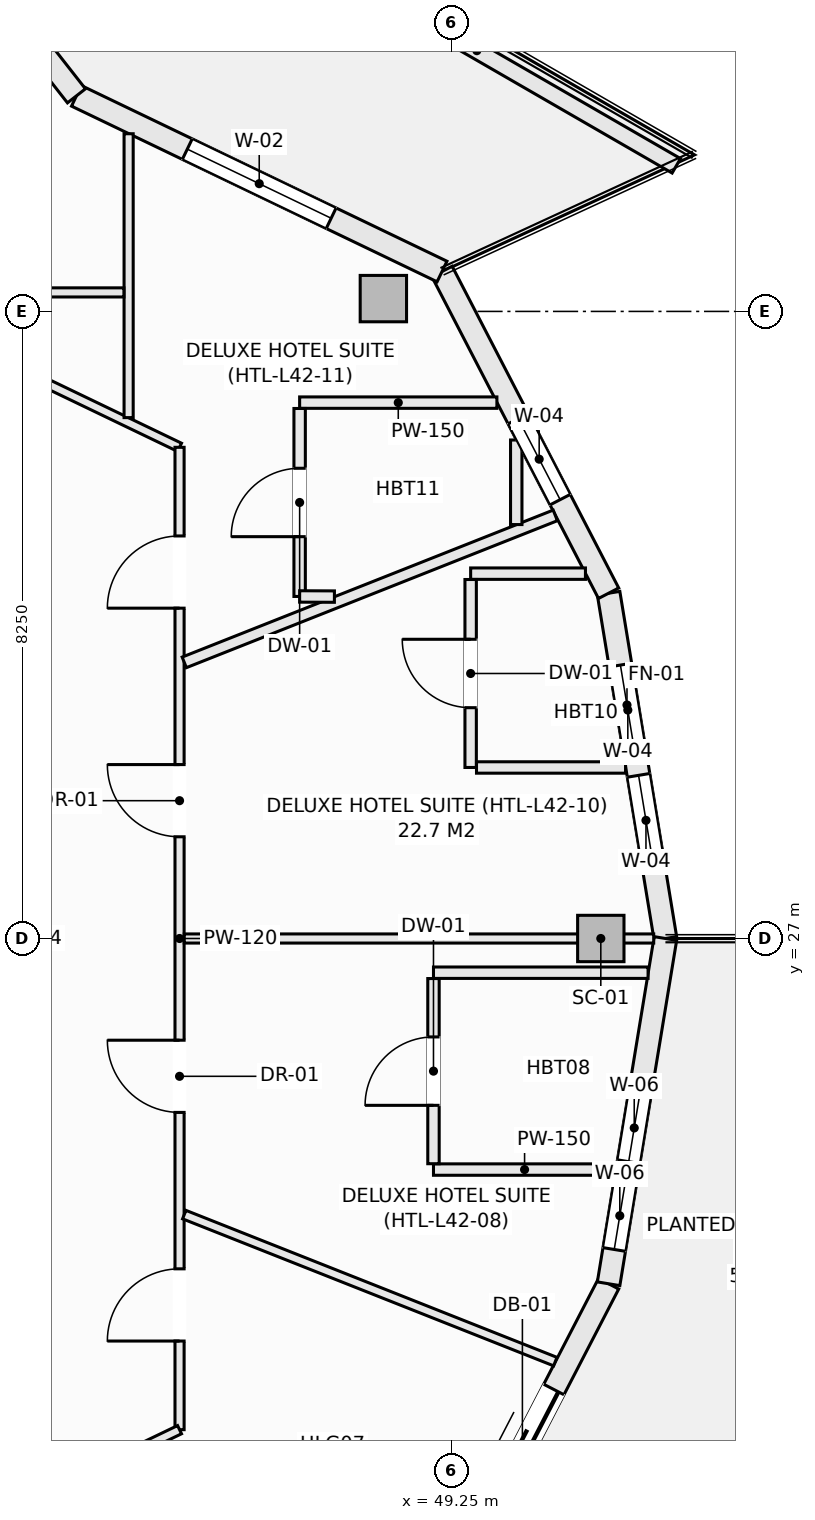
"""IFC4 building model, lengths in metres.
Left out: names, types, materials, properties, quantities, classifications, styles, units other than length and angle.
Written with IfcOpenShell. Run it as: python <this file> out.ifc"""

import sys

from ifc_helpers import new_model, si_unit, direction, frame, frame_2d, origin, origin_2d, place, context, subcontext, project, spatial, rectangle, hollow_rectangle, extrude, element, fill, save


model = new_model("IFC4")
c1 = context("Model", 3, precision=1e-05, world=origin(), true_north=direction((0.0, 1.0)))
c2 = subcontext(c1, "Body", "Model", "MODEL_VIEW")
j1 = project(units=[si_unit("LENGTHUNIT", "METRE"), si_unit("PLANEANGLEUNIT", "RADIAN")], contexts=[c1])
p1 = place(None, origin())
s1 = spatial("IfcSite", under=j1, at=p1, CompositionType="ELEMENT")
p2 = place(p1, origin())
s2 = spatial("IfcBuilding", under=s1, at=p2, CompositionType="ELEMENT")
p3 = place(p2, frame((0.0, 0.0, 163.1)))
s3 = spatial("IfcBuildingStorey", under=s2, at=p3, CompositionType="ELEMENT", Elevation=163.1)
for number, where, z_axis, x_axis in (
    (1, (51.212, 27.0, -0.27), (0.0, 0.0, 1.0), (1.0, 0.0, 0.0)),
    (2, (48.352, 35.419, -0.27), (0.0, 0.0, 1.0), (1.0, 0.0, 0.0)),
):
    element("IfcColumn", number, at=place(p3, frame(where, z_axis=z_axis, x_axis=x_axis)), inside=s3, PredefinedType="COLUMN", context=c2, shape_type="SweptSolid", body=[
        extrude(hollow_rectangle(XDim=0.61, YDim=0.61, WallThickness=0.025, at=origin_2d()), origin(), (0.0, 0.0, 1.0), 3.4),
    ])
p4 = place(p3, frame((51.315, 31.542, 0.0), z_axis=(0.0, 0.0, 1.0), x_axis=(0.162394765401, -0.986725868806, 0.0)))
e3 = element("IfcWall", 3, at=p4, inside=s3, PredefinedType="SOLIDWALL", context=c2, shape_type="SweptSolid", body=[
    extrude(rectangle(XDim=4.603, YDim=0.3, at=frame_2d((2.302, 0.0))), origin(), (0.0, 0.0, 1.0), 2.653),
])
p5 = place(p4, frame((0.958, 0.0, 0.74)))
e4 = element("IfcOpeningElement", 4, at=p5, cuts=e3, PredefinedType="OPENING", context=c2, shape_type="SweptSolid", body=[
    extrude(rectangle(XDim=1.2, YDim=1.7, at=frame_2d((0.6, 0.85))), frame((0.0, 0.16, 0.0), z_axis=(0.0, -1.0, 0.0), x_axis=(1.0, 0.0, 0.0)), (0.0, 0.0, 1.0), 0.32),
])
p6 = place(p4, frame((2.428, 0.0, 0.74)))
e5 = element("IfcOpeningElement", 5, at=p6, cuts=e3, PredefinedType="OPENING", context=c2, shape_type="SweptSolid", body=[
    extrude(rectangle(XDim=1.2, YDim=1.7, at=frame_2d((0.6, 0.85))), frame((0.0, 0.16, 0.0), z_axis=(0.0, -1.0, 0.0), x_axis=(1.0, 0.0, 0.0)), (0.0, 0.0, 1.0), 0.32),
])
p7 = place(p3, frame((49.123, 35.775, 0.0), z_axis=(0.0, 0.0, 1.0), x_axis=(0.459810251451, -0.888017191647, 0.0)))
e6 = element("IfcWall", 6, at=p7, inside=s3, PredefinedType="SOLIDWALL", context=c2, shape_type="SweptSolid", body=[
    extrude(rectangle(XDim=4.766, YDim=0.3, at=frame_2d((2.383, 0.0))), origin(), (0.0, 0.0, 1.0), 2.653),
])
p8 = place(p7, frame((2.18, 0.0, 0.72)))
e7 = element("IfcOpeningElement", 7, at=p8, cuts=e6, PredefinedType="OPENING", context=c2, shape_type="SweptSolid", body=[
    extrude(rectangle(XDim=1.2, YDim=1.65, at=frame_2d((0.6, 0.825))), frame((0.0, 0.16, 0.0), z_axis=(0.0, -1.0, 0.0), x_axis=(1.0, 0.0, 0.0)), (0.0, 0.0, 1.0), 0.32),
])
p9 = place(p3, frame((44.313, 38.086, 0.0), z_axis=(0.0, 0.0, 1.0), x_axis=(0.901353070301, -0.433085029363, 0.0)))
e8 = element("IfcWall", 8, at=p9, inside=s3, PredefinedType="SOLIDWALL", context=c2, shape_type="SweptSolid", body=[
    extrude(rectangle(XDim=5.336, YDim=0.3, at=frame_2d((2.668, 0.0))), origin(), (0.0, 0.0, 1.0), 2.653),
])
p10 = place(p9, frame((1.618, 0.0, 0.74)))
e9 = element("IfcOpeningElement", 9, at=p10, cuts=e8, PredefinedType="OPENING", context=c2, shape_type="SweptSolid", body=[
    extrude(rectangle(XDim=2.1, YDim=1.7, at=frame_2d((1.05, 0.85))), frame((0.0, 0.16, 0.0), z_axis=(0.0, -1.0, 0.0), x_axis=(1.0, 0.0, 0.0)), (0.0, 0.0, 1.0), 0.32),
])
p11 = place(p3, frame((41.094, 42.199, 0.0), z_axis=(0.0, 0.0, 1.0), x_axis=(0.616429245738, -0.787410302828, 0.0)))
e10 = element("IfcWall", 10, at=p11, inside=s3, PredefinedType="SOLIDWALL", context=c2, shape_type="SweptSolid", body=[
    extrude(rectangle(XDim=5.223, YDim=0.3, at=frame_2d((2.612, 0.0))), origin(), (0.0, 0.0, 1.0), 2.653),
])
p12 = place(p11, frame((1.712, 0.0, 0.0)))
e11 = element("IfcOpeningElement", 11, at=p12, cuts=e10, PredefinedType="OPENING", context=c2, shape_type="SweptSolid", body=[
    extrude(rectangle(XDim=1.8, YDim=2.25, at=frame_2d((0.9, 1.125))), frame((0.0, 0.16, 0.0), z_axis=(0.0, -1.0, 0.0), x_axis=(1.0, 0.0, 0.0)), (0.0, 0.0, 1.0), 0.32),
])
p13 = place(p3, frame((49.123, 18.225, 0.0), z_axis=(0.0, 0.0, 1.0), x_axis=(0.459810251451, 0.888017191647, 0.0)))
e12 = element("IfcWall", 12, at=p13, inside=s3, PredefinedType="SOLIDWALL", context=c2, shape_type="SweptSolid", body=[
    extrude(rectangle(XDim=4.766, YDim=0.3, at=frame_2d((2.383, 0.0))), origin(), (0.0, 0.0, 1.0), 2.653),
])
p14 = place(p13, frame((1.4, 0.0, 0.0)))
e13 = element("IfcOpeningElement", 13, at=p14, cuts=e12, PredefinedType="OPENING", context=c2, shape_type="SweptSolid", body=[
    extrude(rectangle(XDim=1.8, YDim=2.25, at=frame_2d((0.9, 1.125))), frame((0.0, 0.16, 0.0), z_axis=(0.0, -1.0, 0.0), x_axis=(1.0, 0.0, 0.0)), (0.0, 0.0, 1.0), 0.32),
])
p15 = place(p3, frame((51.315, 22.458, 0.0), z_axis=(0.0, 0.0, 1.0), x_axis=(0.162394765401, 0.986725868806, 0.0)))
e14 = element("IfcWall", 14, at=p15, inside=s3, PredefinedType="SOLIDWALL", context=c2, shape_type="SweptSolid", body=[
    extrude(rectangle(XDim=4.603, YDim=0.3, at=frame_2d((2.302, 0.0))), origin(), (0.0, 0.0, 1.0), 2.653),
])
p16 = place(p15, frame((0.457, 0.0, 0.72)))
e15 = element("IfcOpeningElement", 15, at=p16, cuts=e14, PredefinedType="OPENING", context=c2, shape_type="SweptSolid", body=[
    extrude(rectangle(XDim=0.9, YDim=1.65, at=frame_2d((0.45, 0.825))), frame((0.0, 0.16, 0.0), z_axis=(0.0, -1.0, 0.0), x_axis=(1.0, 0.0, 0.0)), (0.0, 0.0, 1.0), 0.32),
])
p17 = place(p15, frame((1.627, 0.0, 0.72)))
e16 = element("IfcOpeningElement", 16, at=p17, cuts=e14, PredefinedType="OPENING", context=c2, shape_type="SweptSolid", body=[
    extrude(rectangle(XDim=0.9, YDim=1.65, at=frame_2d((0.45, 0.825))), frame((0.0, 0.16, 0.0), z_axis=(0.0, -1.0, 0.0), x_axis=(1.0, 0.0, 0.0)), (0.0, 0.0, 1.0), 0.32),
])
p18 = place(p3, frame((46.958, 40.195, 0.0), z_axis=(0.0, 0.0, 1.0), x_axis=(0.866058128659, -0.499943314571, 0.0)))
e17 = element("IfcWall", 17, at=p18, inside=s3, PredefinedType="PARAPET", context=c2, shape_type="SweptSolid", body=[
    extrude(rectangle(XDim=6.06, YDim=0.22, at=frame_2d((3.03, 0.0))), origin(), (0.0, 0.0, 1.0), 0.52),
])
p19 = place(p3, frame((52.18, 16.779, 0.0), z_axis=(0.0, 0.0, 1.0), x_axis=(0.439637174641, 0.898175458735, 0.0)))
e18 = element("IfcWall", 18, at=p19, inside=s3, PredefinedType="PARAPET", context=c2, shape_type="SweptSolid", body=[
    extrude(rectangle(XDim=5.567, YDim=0.22, at=frame_2d((2.784, 0.0))), origin(), (0.0, 0.0, 1.0), 0.52),
])
p20 = place(p3, frame((49.011, 23.96, 0.0), z_axis=(0.0, 0.0, 1.0), x_axis=(1.0, 0.0, 0.0)))
e19 = element("IfcWall", 19, at=p20, inside=s3, PredefinedType="PARTITIONING", context=c2, shape_type="SweptSolid", body=[
    extrude(rectangle(XDim=2.397, YDim=0.15, at=frame_2d((1.199, 0.0))), origin(), (0.0, 0.0, 1.0), 3.13),
])
p21 = place(p3, frame((43.812, 34.355, 0.0), z_axis=(0.0, 0.0, 1.0), x_axis=(0.901236415331, -0.433327732417, 0.0)))
e20 = element("IfcWall", 20, at=p21, inside=s3, PredefinedType="PARTITIONING", context=c2, shape_type="SweptSolid", body=[
    extrude(rectangle(XDim=2.062, YDim=0.12, at=frame_2d((1.031, 0.0))), origin(), (0.0, 0.0, 1.0), 3.13),
])
p22 = place(p3, frame((45.67, 20.538, 0.0), z_axis=(0.0, 0.0, 1.0), x_axis=(0.0, 1.0, 0.0)))
e21 = element("IfcWall", 21, at=p22, inside=s3, PredefinedType="PARTITIONING", context=c2, shape_type="SweptSolid", body=[
    extrude(rectangle(XDim=12.924, YDim=0.12, at=frame_2d((6.462, 0.0))), origin(), (0.0, 0.0, 1.0), 3.13),
])
p23 = place(p22, frame((1.166, 0.0, 0.0)))
e22 = element("IfcOpeningElement", 22, at=p23, cuts=e21, PredefinedType="OPENING", context=c2, shape_type="SweptSolid", body=[
    extrude(rectangle(XDim=0.95, YDim=2.1, at=frame_2d((0.475, 1.05))), frame((0.0, 0.07, 0.0), z_axis=(0.0, -1.0, 0.0), x_axis=(1.0, 0.0, 0.0)), (0.0, 0.0, 1.0), 0.14),
])
p24 = place(p22, frame((4.174, 0.0, 0.0)))
e23 = element("IfcOpeningElement", 23, at=p24, cuts=e21, PredefinedType="OPENING", context=c2, shape_type="SweptSolid", body=[
    extrude(rectangle(XDim=0.95, YDim=2.1, at=frame_2d((0.475, 1.05))), frame((0.0, 0.07, 0.0), z_axis=(0.0, -1.0, 0.0), x_axis=(1.0, 0.0, 0.0)), (0.0, 0.0, 1.0), 0.14),
])
p25 = place(p22, frame((7.8, 0.0, 0.0)))
e24 = element("IfcOpeningElement", 24, at=p25, cuts=e21, PredefinedType="OPENING", context=c2, shape_type="SweptSolid", body=[
    extrude(rectangle(XDim=0.95, YDim=2.1, at=frame_2d((0.475, 1.05))), frame((0.0, 0.07, 0.0), z_axis=(0.0, -1.0, 0.0), x_axis=(1.0, 0.0, 0.0)), (0.0, 0.0, 1.0), 0.14),
])
p26 = place(p22, frame((10.808, 0.0, 0.0)))
e25 = element("IfcOpeningElement", 25, at=p26, cuts=e21, PredefinedType="OPENING", context=c2, shape_type="SweptSolid", body=[
    extrude(rectangle(XDim=0.95, YDim=2.1, at=frame_2d((0.475, 1.05))), frame((0.0, 0.07, 0.0), z_axis=(0.0, -1.0, 0.0), x_axis=(1.0, 0.0, 0.0)), (0.0, 0.0, 1.0), 0.14),
])
p27 = place(p3, frame((43.812, 19.645, 0.0), z_axis=(0.0, 0.0, 1.0), x_axis=(0.901236415331, 0.433327732417, 0.0)))
e26 = element("IfcWall", 26, at=p27, inside=s3, PredefinedType="PARTITIONING", context=c2, shape_type="SweptSolid", body=[
    extrude(rectangle(XDim=2.062, YDim=0.12, at=frame_2d((1.031, 0.0))), origin(), (0.0, 0.0, 1.0), 3.13),
])
p28 = place(p3, frame((45.732, 27.0, 0.0), z_axis=(0.0, 0.0, 1.0), x_axis=(1.0, 0.0, 0.0)))
e27 = element("IfcWall", 27, at=p28, inside=s3, PredefinedType="PARTITIONING", context=c2, shape_type="SweptSolid", body=[
    extrude(rectangle(XDim=6.177, YDim=0.12, at=frame_2d((3.088, 0.0))), origin(), (0.0, 0.0, 1.0), 2.505),
])
p29 = place(p3, frame((45.0, 33.853, 0.0), z_axis=(0.0, 0.0, 1.0), x_axis=(0.0, 1.0, 0.0)))
e28 = element("IfcWall", 28, at=p29, inside=s3, PredefinedType="PARTITIONING", context=c2, shape_type="SweptSolid", body=[
    extrude(rectangle(XDim=3.735, YDim=0.12, at=frame_2d((1.867, 0.0))), origin(), (0.0, 0.0, 1.0), 3.13),
])
p30 = place(p3, frame((45.732, 23.367, 0.0), z_axis=(0.0, 0.0, 1.0), x_axis=(0.929706134606, -0.368302190158, 0.0)))
e29 = element("IfcWall", 29, at=p30, inside=s3, PredefinedType="PARTITIONING", context=c2, shape_type="SweptSolid", body=[
    extrude(rectangle(XDim=5.251, YDim=0.12, at=frame_2d((2.625, 0.0))), origin(), (0.0, 0.0, 1.0), 3.13),
])
p31 = place(p3, frame((49.011, 26.55, 0.0), z_axis=(0.0, 0.0, 1.0), x_axis=(1.0, 0.0, 0.0)))
e30 = element("IfcWall", 30, at=p31, inside=s3, PredefinedType="PARTITIONING", context=c2, shape_type="SweptSolid", body=[
    extrude(rectangle(XDim=2.823, YDim=0.15, at=frame_2d((1.412, 0.0))), origin(), (0.0, 0.0, 1.0), 3.13),
])
p32 = place(p3, frame((49.011, 24.037, 0.0), z_axis=(0.0, 0.0, 1.0), x_axis=(0.0, 1.0, 0.0)))
e31 = element("IfcWall", 31, at=p32, inside=s3, PredefinedType="PARTITIONING", context=c2, shape_type="SweptSolid", body=[
    extrude(rectangle(XDim=2.436, YDim=0.15, at=frame_2d((1.218, 0.0))), origin(), (0.0, 0.0, 1.0), 3.13),
])
p33 = place(p32, frame((0.768, 0.0, 0.0)))
e32 = element("IfcOpeningElement", 32, at=p33, cuts=e31, PredefinedType="OPENING", context=c2, shape_type="SweptSolid", body=[
    extrude(rectangle(XDim=0.9, YDim=2.1, at=frame_2d((0.45, 1.05))), frame((0.0, 0.085, 0.0), z_axis=(0.0, -1.0, 0.0), x_axis=(1.0, 0.0, 0.0)), (0.0, 0.0, 1.0), 0.17),
])
p34 = place(p3, frame((49.5, 31.8, 0.0), z_axis=(0.0, 0.0, 1.0), x_axis=(1.0, 0.0, 0.0)))
e33 = element("IfcWall", 33, at=p34, inside=s3, PredefinedType="PARTITIONING", context=c2, shape_type="SweptSolid", body=[
    extrude(rectangle(XDim=1.51, YDim=0.15, at=frame_2d((0.755, 0.0))), origin(), (0.0, 0.0, 1.0), 3.13),
])
p35 = place(p3, frame((49.5, 29.25, 0.0), z_axis=(0.0, 0.0, 1.0), x_axis=(0.0, 1.0, 0.0)))
e34 = element("IfcWall", 34, at=p35, inside=s3, PredefinedType="PARTITIONING", context=c2, shape_type="SweptSolid", body=[
    extrude(rectangle(XDim=2.473, YDim=0.15, at=frame_2d((1.236, 0.0))), origin(), (0.0, 0.0, 1.0), 2.653),
])
p36 = place(p35, frame((0.787, 0.0, 0.0)))
e35 = element("IfcOpeningElement", 35, at=p36, cuts=e34, PredefinedType="OPENING", context=c2, shape_type="SweptSolid", body=[
    extrude(rectangle(XDim=0.9, YDim=2.1, at=frame_2d((0.45, 1.05))), frame((0.0, 0.085, 0.0), z_axis=(0.0, -1.0, 0.0), x_axis=(1.0, 0.0, 0.0)), (0.0, 0.0, 1.0), 0.17),
])
p37 = place(p3, frame((49.577, 29.25, 0.0), z_axis=(0.0, 0.0, 1.0), x_axis=(1.0, 0.0, 0.0)))
e36 = element("IfcWall", 36, at=p37, inside=s3, PredefinedType="PARTITIONING", context=c2, shape_type="SweptSolid", body=[
    extrude(rectangle(XDim=1.961, YDim=0.15, at=frame_2d((0.98, 0.0))), origin(), (0.0, 0.0, 1.0), 3.13),
])
p38 = place(p3, frame((45.732, 30.633, 0.0), z_axis=(0.0, 0.0, 1.0), x_axis=(0.929706134606, 0.368302190158, 0.0)))
e37 = element("IfcWall", 37, at=p38, inside=s3, PredefinedType="PARTITIONING", context=c2, shape_type="SweptSolid", body=[
    extrude(rectangle(XDim=5.251, YDim=0.15, at=frame_2d((2.625, 0.0))), origin(), (0.0, 0.0, 1.0), 3.13),
])
p39 = place(p3, frame((47.25, 34.05, 0.0), z_axis=(0.0, 0.0, 1.0), x_axis=(1.0, 0.0, 0.0)))
e38 = element("IfcWall", 38, at=p39, inside=s3, PredefinedType="PARTITIONING", context=c2, shape_type="SweptSolid", body=[
    extrude(rectangle(XDim=2.595, YDim=0.15, at=frame_2d((1.298, 0.0))), origin(), (0.0, 0.0, 1.0), 3.13),
])
p40 = place(p3, frame((47.25, 31.5, 0.0), z_axis=(0.0, 0.0, 1.0), x_axis=(0.0, 1.0, 0.0)))
e39 = element("IfcWall", 39, at=p40, inside=s3, PredefinedType="PARTITIONING", context=c2, shape_type="SweptSolid", body=[
    extrude(rectangle(XDim=2.473, YDim=0.15, at=frame_2d((1.236, 0.0))), origin(), (0.0, 0.0, 1.0), 3.13),
])
p41 = place(p40, frame((0.787, 0.0, 0.0)))
e40 = element("IfcOpeningElement", 40, at=p41, cuts=e39, PredefinedType="OPENING", context=c2, shape_type="SweptSolid", body=[
    extrude(rectangle(XDim=0.9, YDim=2.1, at=frame_2d((0.45, 1.05))), frame((0.0, 0.085, 0.0), z_axis=(0.0, -1.0, 0.0), x_axis=(1.0, 0.0, 0.0)), (0.0, 0.0, 1.0), 0.17),
])
p42 = place(p3, frame((47.25, 31.5, 0.0), z_axis=(0.0, 0.0, 1.0), x_axis=(0.999990888186, -0.004268904539, 0.0)))
e41 = element("IfcWall", 41, at=p42, inside=s3, PredefinedType="PARTITIONING", context=c2, shape_type="SweptSolid", body=[
    extrude(rectangle(XDim=0.458, YDim=0.15, at=frame_2d((0.229, 0.0))), origin(), (0.0, 0.0, 1.0), 3.13),
])
p43 = place(p3, frame((50.1, 32.446, 0.0), z_axis=(0.0, 0.0, 1.0), x_axis=(0.0, 1.0, 0.0)))
e42 = element("IfcWall", 42, at=p43, inside=s3, PredefinedType="PARTITIONING", context=c2, shape_type="SweptSolid", body=[
    extrude(rectangle(XDim=1.113, YDim=0.15, at=frame_2d((0.556, 0.0))), origin(), (0.0, 0.0, 1.0), 3.13),
])
p44 = place(p3, frame((39.082, 35.5, 0.0), z_axis=(0.0, 0.0, 1.0), x_axis=(1.0, 0.0, 0.0)))
e43 = element("IfcWall", 43, at=p44, inside=s3, PredefinedType="PARTITIONING", context=c2, shape_type="SweptSolid", body=[
    extrude(rectangle(XDim=5.856, YDim=0.12, at=frame_2d((2.928, 0.0))), origin(), (0.0, 0.0, 1.0), 2.812),
])
p45 = place(p5, origin())
e44 = element("IfcWindow", 44, at=p45, inside=s3, PartitioningType="SINGLE_PANEL", PredefinedType="WINDOW", context=c2, shape_type="SweptSolid", body=[
    extrude(rectangle(XDim=1.2, YDim=1.7, at=frame_2d((0.6, 0.85))), frame((0.0, 0.03, 0.0), z_axis=(0.0, -1.0, 0.0), x_axis=(1.0, 0.0, 0.0)), (0.0, 0.0, 1.0), 0.06),
])
fill(e4, e44)
p46 = place(p8, origin())
e45 = element("IfcWindow", 45, at=p46, inside=s3, PartitioningType="SINGLE_PANEL", PredefinedType="WINDOW", context=c2, shape_type="SweptSolid", body=[
    extrude(rectangle(XDim=1.2, YDim=1.65, at=frame_2d((0.6, 0.825))), frame((0.0, 0.03, 0.0), z_axis=(0.0, -1.0, 0.0), x_axis=(1.0, 0.0, 0.0)), (0.0, 0.0, 1.0), 0.06),
])
fill(e7, e45)
p47 = place(p10, origin())
e46 = element("IfcWindow", 46, at=p47, inside=s3, PartitioningType="SINGLE_PANEL", PredefinedType="WINDOW", context=c2, shape_type="SweptSolid", body=[
    extrude(rectangle(XDim=2.1, YDim=1.7, at=frame_2d((1.05, 0.85))), frame((0.0, 0.03, 0.0), z_axis=(0.0, -1.0, 0.0), x_axis=(1.0, 0.0, 0.0)), (0.0, 0.0, 1.0), 0.06),
])
fill(e9, e46)
p48 = place(p14, frame((1.8, 0.0, 0.0), z_axis=(0.0, 0.0, 1.0), x_axis=(-1.0, 0.0, 0.0)))
e47 = element("IfcDoor", 47, at=p48, inside=s3, OperationType="SLIDING_TO_LEFT", PredefinedType="DOOR", context=c2, shape_type="SweptSolid", body=[
    extrude(rectangle(XDim=1.8, YDim=2.25, at=frame_2d((0.9, 1.125))), frame((0.0, 0.025, 0.0), z_axis=(0.0, -1.0, 0.0), x_axis=(1.0, 0.0, 0.0)), (0.0, 0.0, 1.0), 0.05),
])
fill(e13, e47)
p49 = place(p16, origin())
e48 = element("IfcWindow", 48, at=p49, inside=s3, PartitioningType="SINGLE_PANEL", PredefinedType="WINDOW", context=c2, shape_type="SweptSolid", body=[
    extrude(rectangle(XDim=0.9, YDim=1.65, at=frame_2d((0.45, 0.825))), frame((0.0, 0.03, 0.0), z_axis=(0.0, -1.0, 0.0), x_axis=(1.0, 0.0, 0.0)), (0.0, 0.0, 1.0), 0.06),
])
fill(e15, e48)
p50 = place(p23, origin())
e49 = element("IfcDoor", 49, at=p50, inside=s3, OperationType="SINGLE_SWING_LEFT", PredefinedType="DOOR", context=c2, shape_type="SweptSolid", body=[
    extrude(rectangle(XDim=0.95, YDim=2.1, at=frame_2d((0.475, 1.05))), frame((0.0, 0.025, 0.0), z_axis=(0.0, -1.0, 0.0), x_axis=(1.0, 0.0, 0.0)), (0.0, 0.0, 1.0), 0.05),
])
fill(e22, e49)
p51 = place(p24, origin())
e50 = element("IfcDoor", 50, at=p51, inside=s3, OperationType="SINGLE_SWING_RIGHT", PredefinedType="DOOR", context=c2, shape_type="SweptSolid", body=[
    extrude(rectangle(XDim=0.95, YDim=2.1, at=frame_2d((0.475, 1.05))), frame((0.0, 0.025, 0.0), z_axis=(0.0, -1.0, 0.0), x_axis=(1.0, 0.0, 0.0)), (0.0, 0.0, 1.0), 0.05),
])
fill(e23, e50)
p52 = place(p25, origin())
e51 = element("IfcDoor", 51, at=p52, inside=s3, OperationType="SINGLE_SWING_RIGHT", PredefinedType="DOOR", context=c2, shape_type="SweptSolid", body=[
    extrude(rectangle(XDim=0.95, YDim=2.1, at=frame_2d((0.475, 1.05))), frame((0.0, 0.025, 0.0), z_axis=(0.0, -1.0, 0.0), x_axis=(1.0, 0.0, 0.0)), (0.0, 0.0, 1.0), 0.05),
])
fill(e24, e51)
p53 = place(p26, origin())
e52 = element("IfcDoor", 52, at=p53, inside=s3, OperationType="SINGLE_SWING_LEFT", PredefinedType="DOOR", context=c2, shape_type="SweptSolid", body=[
    extrude(rectangle(XDim=0.95, YDim=2.1, at=frame_2d((0.475, 1.05))), frame((0.0, 0.025, 0.0), z_axis=(0.0, -1.0, 0.0), x_axis=(1.0, 0.0, 0.0)), (0.0, 0.0, 1.0), 0.05),
])
fill(e25, e52)
p54 = place(p33, origin())
e53 = element("IfcDoor", 53, at=p54, inside=s3, OperationType="SINGLE_SWING_LEFT", PredefinedType="DOOR", context=c2, shape_type="SweptSolid", body=[
    extrude(rectangle(XDim=0.9, YDim=2.1, at=frame_2d((0.45, 1.05))), frame((0.0, 0.025, 0.0), z_axis=(0.0, -1.0, 0.0), x_axis=(1.0, 0.0, 0.0)), (0.0, 0.0, 1.0), 0.05),
])
fill(e32, e53)
p55 = place(p36, origin())
e54 = element("IfcDoor", 54, at=p55, inside=s3, OperationType="SINGLE_SWING_RIGHT", PredefinedType="DOOR", context=c2, shape_type="SweptSolid", body=[
    extrude(rectangle(XDim=0.9, YDim=2.1, at=frame_2d((0.45, 1.05))), frame((0.0, 0.025, 0.0), z_axis=(0.0, -1.0, 0.0), x_axis=(1.0, 0.0, 0.0)), (0.0, 0.0, 1.0), 0.05),
])
fill(e35, e54)
p56 = place(p41, origin())
e55 = element("IfcDoor", 55, at=p56, inside=s3, OperationType="SINGLE_SWING_LEFT", PredefinedType="DOOR", context=c2, shape_type="SweptSolid", body=[
    extrude(rectangle(XDim=0.9, YDim=2.1, at=frame_2d((0.45, 1.05))), frame((0.0, 0.025, 0.0), z_axis=(0.0, -1.0, 0.0), x_axis=(1.0, 0.0, 0.0)), (0.0, 0.0, 1.0), 0.05),
])
fill(e40, e55)
p57 = place(p6, origin())
e56 = element("IfcWindow", 56, at=p57, inside=s3, PartitioningType="SINGLE_PANEL", PredefinedType="WINDOW", context=c2, shape_type="SweptSolid", body=[
    extrude(rectangle(XDim=1.2, YDim=1.7, at=frame_2d((0.6, 0.85))), frame((0.0, 0.03, 0.0), z_axis=(0.0, -1.0, 0.0), x_axis=(1.0, 0.0, 0.0)), (0.0, 0.0, 1.0), 0.06),
])
fill(e5, e56)
p58 = place(p17, origin())
e57 = element("IfcWindow", 57, at=p58, inside=s3, PartitioningType="SINGLE_PANEL", PredefinedType="WINDOW", context=c2, shape_type="SweptSolid", body=[
    extrude(rectangle(XDim=0.9, YDim=1.65, at=frame_2d((0.45, 0.825))), frame((0.0, 0.03, 0.0), z_axis=(0.0, -1.0, 0.0), x_axis=(1.0, 0.0, 0.0)), (0.0, 0.0, 1.0), 0.06),
])
fill(e16, e57)
save(model, sys.argv[1])
